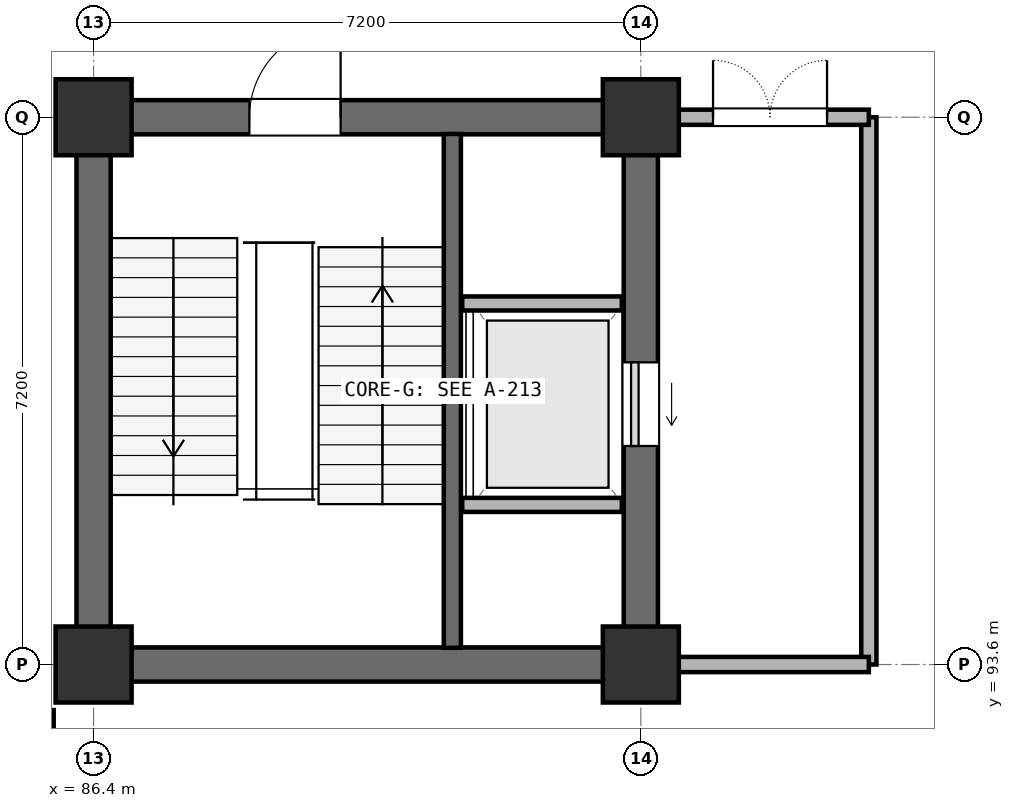
"""IFC4 building model, lengths in metres.
Left out: names, types, materials, properties, quantities, classifications, styles, units other than length and angle.
Written with IfcOpenShell. Run it as: python <this file> out.ifc"""

import sys

from ifc_helpers import new_model, si_unit, direction, frame, frame_2d, origin, origin_2d, place, context, subcontext, project, spatial, rectangle, extrude, element, fill, save


model = new_model("IFC4")
c1 = context("Model", 3, precision=1e-05, world=origin(), true_north=direction((0.0, 1.0)))
c2 = subcontext(c1, "Body", "Model", "MODEL_VIEW")
j1 = project(units=[si_unit("LENGTHUNIT", "METRE"), si_unit("PLANEANGLEUNIT", "RADIAN")], contexts=[c1])
p1 = place(None, origin())
s1 = spatial("IfcSite", under=j1, at=p1, CompositionType="ELEMENT")
p2 = place(p1, origin())
s2 = spatial("IfcBuilding", under=s1, at=p2, CompositionType="ELEMENT")
p3 = place(p2, frame((0.0, 0.0, -4.8)))
s3 = spatial("IfcBuildingStorey", under=s2, at=p3, CompositionType="ELEMENT", Elevation=-4.8)
for number, where, z_axis, x_axis in (
    (1, (86.4, 93.6, 0.0), (0.0, 0.0, 1.0), (1.0, 0.0, 0.0)),
    (2, (86.4, 100.8, 0.0), (0.0, 0.0, 1.0), (1.0, 0.0, 0.0)),
    (3, (93.6, 93.6, 0.0), (0.0, 0.0, 1.0), (1.0, 0.0, 0.0)),
    (4, (93.6, 100.8, 0.0), (0.0, 0.0, 1.0), (1.0, 0.0, 0.0)),
):
    element("IfcColumn", number, at=place(p3, frame(where, z_axis=z_axis, x_axis=x_axis)), inside=s3, PredefinedType="COLUMN", context=c2, shape_type="SweptSolid", body=[
        extrude(rectangle(XDim=1.0, YDim=1.0, at=origin_2d()), origin(), (0.0, 0.0, 1.0), 4.8),
    ])
p4 = place(p3, frame((86.75, 93.6, 0.0), z_axis=(0.0, 0.0, 1.0), x_axis=(1.0, 0.0, 0.0)))
e5 = element("IfcWall", 5, at=p4, inside=s3, PredefinedType="SHEAR", context=c2, shape_type="SweptSolid", body=[
    extrude(rectangle(XDim=6.5, YDim=0.45, at=frame_2d((3.25, 0.0))), origin(), (0.0, 0.0, 1.0), 4.8),
])
p5 = place(p3, frame((93.6, 93.95, 0.0), z_axis=(0.0, 0.0, 1.0), x_axis=(0.0, 1.0, 0.0)))
e6 = element("IfcWall", 6, at=p5, inside=s3, PredefinedType="SHEAR", context=c2, shape_type="SweptSolid", body=[
    extrude(rectangle(XDim=6.5, YDim=0.45, at=frame_2d((3.25, 0.0))), origin(), (0.0, 0.0, 1.0), 4.8),
])
p6 = place(p5, frame((2.525, 0.0, 0.0)))
e7 = element("IfcOpeningElement", 7, at=p6, cuts=e6, PredefinedType="OPENING", context=c2, shape_type="SweptSolid", body=[
    extrude(rectangle(XDim=1.1, YDim=2.2, at=frame_2d((0.55, 1.1))), frame((0.0, 0.235, 0.0), z_axis=(0.0, -1.0, 0.0), x_axis=(1.0, 0.0, 0.0)), (0.0, 0.0, 1.0), 0.47),
])
p7 = place(p3, frame((93.25, 100.8, 0.0), z_axis=(0.0, 0.0, 1.0), x_axis=(-1.0, 0.0, 0.0)))
e8 = element("IfcWall", 8, at=p7, inside=s3, PredefinedType="SHEAR", context=c2, shape_type="SweptSolid", body=[
    extrude(rectangle(XDim=6.5, YDim=0.45, at=frame_2d((3.25, 0.0))), origin(), (0.0, 0.0, 1.0), 4.8),
])
p8 = place(p7, frame((3.6, 0.0, 0.0)))
e9 = element("IfcOpeningElement", 9, at=p8, cuts=e8, PredefinedType="OPENING", context=c2, shape_type="SweptSolid", body=[
    extrude(rectangle(XDim=1.2, YDim=2.2, at=frame_2d((0.6, 1.1))), frame((0.0, 0.235, 0.0), z_axis=(0.0, -1.0, 0.0), x_axis=(1.0, 0.0, 0.0)), (0.0, 0.0, 1.0), 0.47),
])
p9 = place(p3, frame((86.4, 100.45, 0.0), z_axis=(0.0, 0.0, 1.0), x_axis=(0.0, -1.0, 0.0)))
e10 = element("IfcWall", 10, at=p9, inside=s3, PredefinedType="SHEAR", context=c2, shape_type="SweptSolid", body=[
    extrude(rectangle(XDim=6.5, YDim=0.45, at=frame_2d((3.25, 0.0))), origin(), (0.0, 0.0, 1.0), 4.8),
])
p10 = place(p3, frame((91.12, 93.82, 0.0), z_axis=(0.0, 0.0, 1.0), x_axis=(0.0, 1.0, 0.0)))
e11 = element("IfcWall", 11, at=p10, inside=s3, PredefinedType="SHEAR", context=c2, shape_type="SweptSolid", body=[
    extrude(rectangle(XDim=6.76, YDim=0.225, at=frame_2d((3.38, 0.0))), origin(), (0.0, 0.0, 1.0), 4.8),
])
for number, where, z_axis, x_axis in (
    (12, (91.25, 95.7, 0.0), (0.0, 0.0, 1.0), (1.0, 0.0, 0.0)),
    (13, (91.25, 98.35, 0.0), (0.0, 0.0, 1.0), (1.0, 0.0, 0.0)),
):
    element("IfcWall", number, at=place(p3, frame(where, z_axis=z_axis, x_axis=x_axis)), inside=s3, PredefinedType="PARTITIONING", context=c2, shape_type="SweptSolid", body=[
        extrude(rectangle(XDim=2.1, YDim=0.185, at=frame_2d((1.05, 0.0))), origin(), (0.0, 0.0, 1.0), 4.8),
    ])
p11 = place(p3, frame((96.6, 93.6, 0.0), z_axis=(0.0, 0.0, 1.0), x_axis=(0.0, 1.0, 0.0)))
e14 = element("IfcWall", 14, at=p11, inside=s3, PredefinedType="PARTITIONING", context=c2, shape_type="SweptSolid", body=[
    extrude(rectangle(XDim=7.2, YDim=0.2, at=frame_2d((3.6, 0.0))), origin(), (0.0, 0.0, 1.0), 3.52),
])
p12 = place(p3, frame((94.08, 93.6, 0.0), z_axis=(0.0, 0.0, 1.0), x_axis=(1.0, 0.0, 0.0)))
e15 = element("IfcWall", 15, at=p12, inside=s3, PredefinedType="PARTITIONING", context=c2, shape_type="SweptSolid", body=[
    extrude(rectangle(XDim=2.52, YDim=0.2, at=frame_2d((1.26, 0.0))), origin(), (0.0, 0.0, 1.0), 3.52),
])
p13 = place(p3, frame((96.6, 100.8, 0.0), z_axis=(0.0, 0.0, 1.0), x_axis=(-1.0, 0.0, 0.0)))
e16 = element("IfcWall", 16, at=p13, inside=s3, PredefinedType="PARTITIONING", context=c2, shape_type="SweptSolid", body=[
    extrude(rectangle(XDim=2.52, YDim=0.2, at=frame_2d((1.26, 0.0))), origin(), (0.0, 0.0, 1.0), 3.52),
])
p14 = place(p13, frame((0.55, 0.0, 0.0)))
e17 = element("IfcOpeningElement", 17, at=p14, cuts=e16, PredefinedType="OPENING", context=c2, shape_type="SweptSolid", body=[
    extrude(rectangle(XDim=1.5, YDim=2.2, at=frame_2d((0.75, 1.1))), frame((0.0, 0.11, 0.0), z_axis=(0.0, -1.0, 0.0), x_axis=(1.0, 0.0, 0.0)), (0.0, 0.0, 1.0), 0.22),
])
p15 = place(p3, frame((85.8, 87.0, 0.0), z_axis=(0.0, 0.0, 1.0), x_axis=(0.0, 1.0, 0.0)))
e18 = element("IfcWall", 18, at=p15, inside=s3, PredefinedType="PARTITIONING", context=c2, shape_type="SweptSolid", body=[
    extrude(rectangle(XDim=6.0, YDim=0.15, at=frame_2d((3.0, 0.0))), origin(), (0.0, 0.0, 1.0), 3.52),
])
p16 = place(p6, origin())
e19 = element("IfcDoor", 19, at=p16, inside=s3, OperationType="SLIDING_TO_LEFT", PredefinedType="DOOR", context=c2, shape_type="SweptSolid", body=[
    extrude(rectangle(XDim=1.1, YDim=2.2, at=frame_2d((0.55, 1.1))), frame((0.0, 0.025, 0.0), z_axis=(0.0, -1.0, 0.0), x_axis=(1.0, 0.0, 0.0)), (0.0, 0.0, 1.0), 0.05),
])
fill(e7, e19)
p17 = place(p8, frame((1.2, 0.0, 0.0), z_axis=(0.0, 0.0, 1.0), x_axis=(-1.0, 0.0, 0.0)))
e20 = element("IfcDoor", 20, at=p17, inside=s3, OperationType="SINGLE_SWING_RIGHT", PredefinedType="DOOR", context=c2, shape_type="SweptSolid", body=[
    extrude(rectangle(XDim=1.2, YDim=2.2, at=frame_2d((0.6, 1.1))), frame((0.0, 0.025, 0.0), z_axis=(0.0, -1.0, 0.0), x_axis=(1.0, 0.0, 0.0)), (0.0, 0.0, 1.0), 0.05),
])
fill(e9, e20)
p18 = place(p14, frame((1.5, 0.0, 0.0), z_axis=(0.0, 0.0, 1.0), x_axis=(-1.0, 0.0, 0.0)))
e21 = element("IfcDoor", 21, at=p18, inside=s3, OperationType="DOUBLE_DOOR_SINGLE_SWING", PredefinedType="DOOR", context=c2, shape_type="SweptSolid", body=[
    extrude(rectangle(XDim=1.5, YDim=2.2, at=frame_2d((0.75, 1.1))), frame((0.0, 0.025, 0.0), z_axis=(0.0, -1.0, 0.0), x_axis=(1.0, 0.0, 0.0)), (0.0, 0.0, 1.0), 0.05),
])
fill(e17, e21)
save(model, sys.argv[1])
